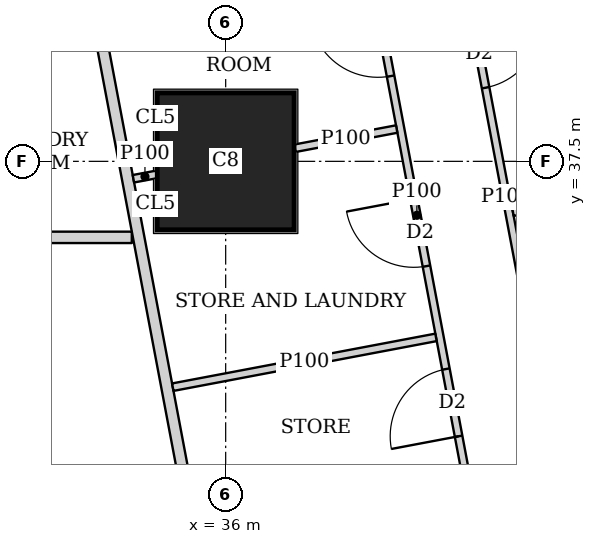
"""IFC4 building model, lengths in metres.
Left out: names, types, materials, properties, quantities, classifications, styles, units other than length and angle.
Written with IfcOpenShell. Run it as: python <this file> out.ifc"""

import sys

from ifc_helpers import new_model, si_unit, direction, frame, frame_2d, origin, origin_2d, place, context, subcontext, project, spatial, rectangle, extrude, element, fill, save


model = new_model("IFC4")
c1 = context("Model", 3, precision=1e-05, world=origin(), true_north=direction((0.0, 1.0)))
c2 = subcontext(c1, "Body", "Model", "MODEL_VIEW")
j1 = project(units=[si_unit("LENGTHUNIT", "METRE"), si_unit("PLANEANGLEUNIT", "RADIAN")], contexts=[c1])
p1 = place(None, origin())
s1 = spatial("IfcSite", under=j1, at=p1, CompositionType="ELEMENT")
p2 = place(p1, origin())
s2 = spatial("IfcBuilding", under=s1, at=p2, CompositionType="ELEMENT")
p3 = place(p2, frame((0.0, 0.0, 68.75)))
s3 = spatial("IfcBuildingStorey", under=s2, at=p3, CompositionType="ELEMENT", Elevation=68.75)
p4 = place(p3, frame((36.0, 37.5, 0.0), z_axis=(0.0, 0.0, 1.0), x_axis=(1.0, 0.0, 0.0)))
e1 = element("IfcColumn", 1, at=p4, inside=s3, PredefinedType="COLUMN", context=c2, shape_type="SweptSolid", body=[
    extrude(rectangle(XDim=1.8, YDim=1.8, at=origin_2d()), origin(), (0.0, 0.0, 1.0), 3.75),
])
p5 = place(p3, frame((8.35, 36.5, 0.0), z_axis=(0.0, 0.0, 1.0), x_axis=(1.0, 0.0, 0.0)))
e2 = element("IfcWall", 2, at=p5, inside=s3, PredefinedType="SOLIDWALL", context=c2, shape_type="SweptSolid", body=[
    extrude(rectangle(XDim=26.415, YDim=0.15, at=frame_2d((13.208, 0.0))), origin(), (0.0, 0.0, 1.0), 3.45),
])
p6 = place(p5, frame((2.6, 0.0, 0.0)))
e3 = element("IfcOpeningElement", 3, at=p6, cuts=e2, PredefinedType="OPENING", context=c2, shape_type="SweptSolid", body=[
    extrude(rectangle(XDim=1.0, YDim=2.1, at=frame_2d((0.5, 1.05))), frame((0.0, 0.085, 0.0), z_axis=(0.0, -1.0, 0.0), x_axis=(1.0, 0.0, 0.0)), (0.0, 0.0, 1.0), 0.17),
])
p7 = place(p5, frame((10.949, 0.0, 0.0)))
e4 = element("IfcOpeningElement", 4, at=p7, cuts=e2, PredefinedType="OPENING", context=c2, shape_type="SweptSolid", body=[
    extrude(rectangle(XDim=1.0, YDim=2.1, at=frame_2d((0.5, 1.05))), frame((0.0, 0.085, 0.0), z_axis=(0.0, -1.0, 0.0), x_axis=(1.0, 0.0, 0.0)), (0.0, 0.0, 1.0), 0.17),
])
p8 = place(p5, frame((18.149, 0.0, 0.0)))
e5 = element("IfcOpeningElement", 5, at=p8, cuts=e2, PredefinedType="OPENING", context=c2, shape_type="SweptSolid", body=[
    extrude(rectangle(XDim=1.0, YDim=2.1, at=frame_2d((0.5, 1.05))), frame((0.0, 0.085, 0.0), z_axis=(0.0, -1.0, 0.0), x_axis=(1.0, 0.0, 0.0)), (0.0, 0.0, 1.0), 0.17),
])
p9 = place(p3, frame((33.68, 42.723, 0.0), z_axis=(0.0, 0.0, 1.0), x_axis=(0.185624129307, -0.98262082342, 0.0)))
e6 = element("IfcWall", 6, at=p9, inside=s3, PredefinedType="SOLIDWALL", context=c2, shape_type="SweptSolid", body=[
    extrude(rectangle(XDim=41.051, YDim=0.15, at=frame_2d((20.526, 0.0))), origin(), (0.0, 0.0, 1.0), 2.45),
])
p10 = place(p9, frame((13.577, 0.0, 0.0)))
e7 = element("IfcOpeningElement", 7, at=p10, cuts=e6, PredefinedType="OPENING", context=c2, shape_type="SweptSolid", body=[
    extrude(rectangle(XDim=1.0, YDim=2.1, at=frame_2d((0.5, 1.05))), frame((0.0, 0.085, 0.0), z_axis=(0.0, -1.0, 0.0), x_axis=(1.0, 0.0, 0.0)), (0.0, 0.0, 1.0), 0.17),
])
p11 = place(p9, frame((17.394, 0.0, 0.0)))
e8 = element("IfcOpeningElement", 8, at=p11, cuts=e6, PredefinedType="OPENING", context=c2, shape_type="SweptSolid", body=[
    extrude(rectangle(XDim=1.0, YDim=2.1, at=frame_2d((0.5, 1.05))), frame((0.0, 0.085, 0.0), z_axis=(0.0, -1.0, 0.0), x_axis=(1.0, 0.0, 0.0)), (0.0, 0.0, 1.0), 0.17),
])
p12 = place(p9, frame((26.758, 0.0, 0.0)))
e9 = element("IfcOpeningElement", 9, at=p12, cuts=e6, PredefinedType="OPENING", context=c2, shape_type="SweptSolid", body=[
    extrude(rectangle(XDim=1.0, YDim=2.1, at=frame_2d((0.5, 1.05))), frame((0.0, 0.085, 0.0), z_axis=(0.0, -1.0, 0.0), x_axis=(1.0, 0.0, 0.0)), (0.0, 0.0, 1.0), 0.17),
])
p13 = place(p9, frame((32.193, 0.0, 0.0)))
e10 = element("IfcOpeningElement", 10, at=p13, cuts=e6, PredefinedType="OPENING", context=c2, shape_type="SweptSolid", body=[
    extrude(rectangle(XDim=1.0, YDim=2.1, at=frame_2d((0.5, 1.05))), frame((0.0, 0.085, 0.0), z_axis=(0.0, -1.0, 0.0), x_axis=(1.0, 0.0, 0.0)), (0.0, 0.0, 1.0), 0.17),
])
p14 = place(p3, frame((38.9, 41.22, 0.0), z_axis=(0.0, 0.0, 1.0), x_axis=(0.185595712897, -0.982626191059, 0.0)))
e11 = element("IfcWall", 11, at=p14, inside=s3, PredefinedType="PARTITIONING", context=c2, shape_type="SweptSolid", body=[
    extrude(rectangle(XDim=8.524, YDim=0.1, at=frame_2d((4.262, 0.0))), origin(), (0.0, 0.0, 1.0), 3.45),
])
p15 = place(p14, frame((7.352, 0.0, 0.0)))
e12 = element("IfcOpeningElement", 12, at=p15, cuts=e11, PredefinedType="OPENING", context=c2, shape_type="SweptSolid", body=[
    extrude(rectangle(XDim=0.9, YDim=2.1, at=frame_2d((0.45, 1.05))), frame((0.0, 0.06, 0.0), z_axis=(0.0, -1.0, 0.0), x_axis=(1.0, 0.0, 0.0)), (0.0, 0.0, 1.0), 0.12),
])
p16 = place(p14, frame((1.9, 0.0, 0.0)))
e13 = element("IfcOpeningElement", 13, at=p16, cuts=e11, PredefinedType="OPENING", context=c2, shape_type="SweptSolid", body=[
    extrude(rectangle(XDim=0.9, YDim=2.1, at=frame_2d((0.45, 1.05))), frame((0.0, 0.06, 0.0), z_axis=(0.0, -1.0, 0.0), x_axis=(1.0, 0.0, 0.0)), (0.0, 0.0, 1.0), 0.12),
])
p17 = place(p3, frame((37.515, 42.089, 0.0), z_axis=(0.0, 0.0, 1.0), x_axis=(0.185565000991, -0.982631991341, 0.0)))
e14 = element("IfcWall", 14, at=p17, inside=s3, PredefinedType="PARTITIONING", context=c2, shape_type="SweptSolid", body=[
    extrude(rectangle(XDim=10.784, YDim=0.1, at=frame_2d((5.392, 0.0))), origin(), (0.0, 0.0, 1.0), 3.45),
])
p18 = place(p17, frame((9.358, 0.0, 0.0)))
e15 = element("IfcOpeningElement", 15, at=p18, cuts=e14, PredefinedType="OPENING", context=c2, shape_type="SweptSolid", body=[
    extrude(rectangle(XDim=0.9, YDim=2.1, at=frame_2d((0.45, 1.05))), frame((0.0, 0.06, 0.0), z_axis=(0.0, -1.0, 0.0), x_axis=(1.0, 0.0, 0.0)), (0.0, 0.0, 1.0), 0.12),
])
p19 = place(p17, frame((5.173, 0.0, 0.0)))
e16 = element("IfcOpeningElement", 16, at=p19, cuts=e14, PredefinedType="OPENING", context=c2, shape_type="SweptSolid", body=[
    extrude(rectangle(XDim=0.9, YDim=2.1, at=frame_2d((0.45, 1.05))), frame((0.0, 0.06, 0.0), z_axis=(0.0, -1.0, 0.0), x_axis=(1.0, 0.0, 0.0)), (0.0, 0.0, 1.0), 0.12),
])
p20 = place(p17, frame((2.629, 0.0, 0.0)))
e17 = element("IfcOpeningElement", 17, at=p20, cuts=e14, PredefinedType="OPENING", context=c2, shape_type="SweptSolid", body=[
    extrude(rectangle(XDim=0.9, YDim=2.1, at=frame_2d((0.45, 1.05))), frame((0.0, 0.06, 0.0), z_axis=(0.0, -1.0, 0.0), x_axis=(1.0, 0.0, 0.0)), (0.0, 0.0, 1.0), 0.12),
])
p21 = place(p17, frame((7.451, 0.0, 0.0)))
e18 = element("IfcOpeningElement", 18, at=p21, cuts=e14, PredefinedType="OPENING", context=c2, shape_type="SweptSolid", body=[
    extrude(rectangle(XDim=0.9, YDim=2.1, at=frame_2d((0.45, 1.05))), frame((0.0, 0.06, 0.0), z_axis=(0.0, -1.0, 0.0), x_axis=(1.0, 0.0, 0.0)), (0.0, 0.0, 1.0), 0.12),
])
p22 = place(p3, frame((40.654, 36.996, 0.0), z_axis=(0.0, 0.0, 1.0), x_axis=(-0.982635224332, -0.185547880349, 0.0)))
e19 = element("IfcWall", 19, at=p22, inside=s3, PredefinedType="PARTITIONING", context=c2, shape_type="SweptSolid", body=[
    extrude(rectangle(XDim=0.889, YDim=0.1, at=frame_2d((0.445, 0.0))), origin(), (0.0, 0.0, 1.0), 3.45),
])
p23 = place(p3, frame((38.25, 37.925, 0.0), z_axis=(0.0, 0.0, 1.0), x_axis=(-0.982650574676, -0.185466568658, 0.0)))
e20 = element("IfcWall", 20, at=p23, inside=s3, PredefinedType="PARTITIONING", context=c2, shape_type="SweptSolid", body=[
    extrude(rectangle(XDim=1.364, YDim=0.1, at=frame_2d((0.682, 0.0))), origin(), (0.0, 0.0, 1.0), 3.45),
])
p24 = place(p3, frame((35.09, 37.328, 0.0), z_axis=(0.0, 0.0, 1.0), x_axis=(-0.982961380226, -0.183812200315, 0.0)))
e21 = element("IfcWall", 21, at=p24, inside=s3, PredefinedType="PARTITIONING", context=c2, shape_type="SweptSolid", body=[
    extrude(rectangle(XDim=0.31, YDim=0.1, at=frame_2d((0.155, 0.0))), origin(), (0.0, 0.0, 1.0), 3.45),
])
p25 = place(p3, frame((38.767, 35.184, 0.0), z_axis=(0.0, 0.0, 1.0), x_axis=(-0.982578451485, -0.185848289414, 0.0)))
e22 = element("IfcWall", 22, at=p25, inside=s3, PredefinedType="PARTITIONING", context=c2, shape_type="SweptSolid", body=[
    extrude(rectangle(XDim=3.525, YDim=0.1, at=frame_2d((1.762, 0.0))), origin(), (0.0, 0.0, 1.0), 3.45),
])
p26 = place(p3, frame((36.861, 15.913, 0.0), z_axis=(0.0, 0.0, 1.0), x_axis=(-0.185588307143, 0.982627589808, 0.0)))
e23 = element("IfcWall", 23, at=p26, inside=s3, PredefinedType="PARTITIONING", context=c2, shape_type="SweptSolid", body=[
    extrude(rectangle(XDim=19.005, YDim=0.125, at=frame_2d((9.502, 0.0))), origin(), (0.0, 0.0, 1.0), 2.45),
])
p27 = place(p26, frame((7.527, 0.0, 0.0)))
e24 = element("IfcOpeningElement", 24, at=p27, cuts=e23, PredefinedType="OPENING", context=c2, shape_type="SweptSolid", body=[
    extrude(rectangle(XDim=1.0, YDim=2.1, at=frame_2d((0.5, 1.05))), frame((0.0, 0.073, 0.0), z_axis=(0.0, -1.0, 0.0), x_axis=(1.0, 0.0, 0.0)), (0.0, 0.0, 1.0), 0.145),
])
p28 = place(p26, frame((15.5, 0.0, 0.0)))
e25 = element("IfcOpeningElement", 25, at=p28, cuts=e23, PredefinedType="OPENING", context=c2, shape_type="SweptSolid", body=[
    extrude(rectangle(XDim=1.0, YDim=2.1, at=frame_2d((0.5, 1.05))), frame((0.0, 0.073, 0.0), z_axis=(0.0, -1.0, 0.0), x_axis=(1.0, 0.0, 0.0)), (0.0, 0.0, 1.0), 0.145),
])
p29 = place(p26, frame((17.602, 0.0, 0.0)))
e26 = element("IfcOpeningElement", 26, at=p29, cuts=e23, PredefinedType="OPENING", context=c2, shape_type="SweptSolid", body=[
    extrude(rectangle(XDim=1.0, YDim=2.1, at=frame_2d((0.5, 1.05))), frame((0.0, 0.073, 0.0), z_axis=(0.0, -1.0, 0.0), x_axis=(1.0, 0.0, 0.0)), (0.0, 0.0, 1.0), 0.145),
])
p30 = place(p16, origin())
e27 = element("IfcDoor", 27, at=p30, inside=s3, OperationType="SINGLE_SWING_LEFT", PredefinedType="DOOR", context=c2, shape_type="SweptSolid", body=[
    extrude(rectangle(XDim=0.9, YDim=2.1, at=frame_2d((0.45, 1.05))), frame((0.0, 0.025, 0.0), z_axis=(0.0, -1.0, 0.0), x_axis=(1.0, 0.0, 0.0)), (0.0, 0.0, 1.0), 0.05),
])
fill(e13, e27)
p31 = place(p19, origin())
e28 = element("IfcDoor", 28, at=p31, inside=s3, OperationType="SINGLE_SWING_RIGHT", PredefinedType="DOOR", context=c2, shape_type="SweptSolid", body=[
    extrude(rectangle(XDim=0.9, YDim=2.1, at=frame_2d((0.45, 1.05))), frame((0.0, 0.025, 0.0), z_axis=(0.0, -1.0, 0.0), x_axis=(1.0, 0.0, 0.0)), (0.0, 0.0, 1.0), 0.05),
])
fill(e16, e28)
p32 = place(p20, origin())
e29 = element("IfcDoor", 29, at=p32, inside=s3, OperationType="SINGLE_SWING_RIGHT", PredefinedType="DOOR", context=c2, shape_type="SweptSolid", body=[
    extrude(rectangle(XDim=0.9, YDim=2.1, at=frame_2d((0.45, 1.05))), frame((0.0, 0.025, 0.0), z_axis=(0.0, -1.0, 0.0), x_axis=(1.0, 0.0, 0.0)), (0.0, 0.0, 1.0), 0.05),
])
fill(e17, e29)
p33 = place(p21, origin())
e30 = element("IfcDoor", 30, at=p33, inside=s3, OperationType="SINGLE_SWING_LEFT", PredefinedType="DOOR", context=c2, shape_type="SweptSolid", body=[
    extrude(rectangle(XDim=0.9, YDim=2.1, at=frame_2d((0.45, 1.05))), frame((0.0, 0.025, 0.0), z_axis=(0.0, -1.0, 0.0), x_axis=(1.0, 0.0, 0.0)), (0.0, 0.0, 1.0), 0.05),
])
fill(e18, e30)
save(model, sys.argv[1])
